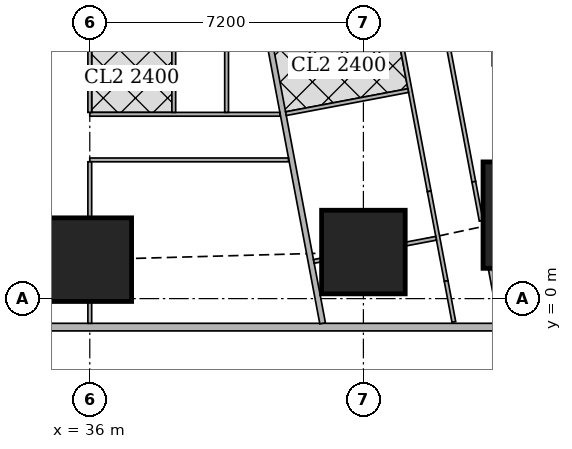
"""IFC4 building model, lengths in metres.
Left out: names, types, materials, properties, quantities, classifications, styles, units other than length and angle.
Written with IfcOpenShell. Run it as: python <this file> out.ifc"""

import sys

from ifc_helpers import new_model, si_unit, direction, frame, frame_2d, origin, origin_2d, place, context, subcontext, project, spatial, rectangle, extrude, element, fill, save


model = new_model("IFC4")
c1 = context("Model", 3, precision=1e-05, world=origin(), true_north=direction((0.0, 1.0)))
c2 = subcontext(c1, "Body", "Model", "MODEL_VIEW")
j1 = project(units=[si_unit("LENGTHUNIT", "METRE"), si_unit("PLANEANGLEUNIT", "RADIAN")], contexts=[c1])
p1 = place(None, origin())
s1 = spatial("IfcSite", under=j1, at=p1, CompositionType="ELEMENT")
p2 = place(p1, origin())
s2 = spatial("IfcBuilding", under=s1, at=p2, CompositionType="ELEMENT")
p3 = place(p2, frame((0.0, 0.0, 100.4)))
s3 = spatial("IfcBuildingStorey", under=s2, at=p3, CompositionType="ELEMENT", Elevation=100.4)
for number, where, z_axis, x_axis in (
    (1, (36.0, 1.025, 0.0), (0.0, 0.0, 1.0), (1.0, 0.0, 0.0)),
    (2, (43.2, 1.225, 0.0), (0.0, 0.0, 1.0), (1.0, 0.0, 0.0)),
):
    element("IfcColumn", number, at=place(p3, frame(where, z_axis=z_axis, x_axis=x_axis)), inside=s3, PredefinedType="COLUMN", context=c2, shape_type="SweptSolid", body=[
        extrude(rectangle(XDim=2.2, YDim=2.2, at=origin_2d()), origin(), (0.0, 0.0, 1.0), 3.75),
    ])
p4 = place(p3, frame((47.748, 2.197, 0.0), z_axis=(0.0, 0.0, 1.0), x_axis=(1.0, 0.0, 0.0)))
e3 = element("IfcColumn", 3, at=p4, inside=s3, PredefinedType="COLUMN", context=c2, shape_type="SweptSolid", body=[
    extrude(rectangle(XDim=2.8, YDim=2.8, at=origin_2d()), origin(), (0.0, 0.0, 1.0), 3.75),
])
p5 = place(p3, frame((2.163, -0.75, 0.0), z_axis=(0.0, 0.0, 1.0), x_axis=(1.0, 0.0, 0.0)))
e4 = element("IfcWall", 4, at=p5, inside=s3, PredefinedType="SOLIDWALL", context=c2, shape_type="SweptSolid", body=[
    extrude(rectangle(XDim=45.628, YDim=0.2, at=frame_2d((22.814, 0.0))), origin(), (0.0, 0.0, 1.0), 3.5),
])
p6 = place(p5, frame((9.537, 0.0, 0.9)))
e5 = element("IfcOpeningElement", 5, at=p6, cuts=e4, PredefinedType="OPENING", context=c2, shape_type="SweptSolid", body=[
    extrude(rectangle(XDim=1.8, YDim=1.5, at=frame_2d((0.9, 0.75))), frame((0.0, 0.11, 0.0), z_axis=(0.0, -1.0, 0.0), x_axis=(1.0, 0.0, 0.0)), (0.0, 0.0, 1.0), 0.22),
])
p7 = place(p5, frame((13.137, 0.0, 0.9)))
e6 = element("IfcOpeningElement", 6, at=p7, cuts=e4, PredefinedType="OPENING", context=c2, shape_type="SweptSolid", body=[
    extrude(rectangle(XDim=1.8, YDim=1.5, at=frame_2d((0.9, 0.75))), frame((0.0, 0.11, 0.0), z_axis=(0.0, -1.0, 0.0), x_axis=(1.0, 0.0, 0.0)), (0.0, 0.0, 1.0), 0.22),
])
p8 = place(p5, frame((16.737, 0.0, 0.9)))
e7 = element("IfcOpeningElement", 7, at=p8, cuts=e4, PredefinedType="OPENING", context=c2, shape_type="SweptSolid", body=[
    extrude(rectangle(XDim=1.8, YDim=1.5, at=frame_2d((0.9, 0.75))), frame((0.0, 0.11, 0.0), z_axis=(0.0, -1.0, 0.0), x_axis=(1.0, 0.0, 0.0)), (0.0, 0.0, 1.0), 0.22),
])
p9 = place(p5, frame((20.337, 0.0, 0.9)))
e8 = element("IfcOpeningElement", 8, at=p9, cuts=e4, PredefinedType="OPENING", context=c2, shape_type="SweptSolid", body=[
    extrude(rectangle(XDim=1.8, YDim=1.5, at=frame_2d((0.9, 0.75))), frame((0.0, 0.11, 0.0), z_axis=(0.0, -1.0, 0.0), x_axis=(1.0, 0.0, 0.0)), (0.0, 0.0, 1.0), 0.22),
])
p10 = place(p5, frame((23.937, 0.0, 0.9)))
e9 = element("IfcOpeningElement", 9, at=p10, cuts=e4, PredefinedType="OPENING", context=c2, shape_type="SweptSolid", body=[
    extrude(rectangle(XDim=1.8, YDim=1.5, at=frame_2d((0.9, 0.75))), frame((0.0, 0.11, 0.0), z_axis=(0.0, -1.0, 0.0), x_axis=(1.0, 0.0, 0.0)), (0.0, 0.0, 1.0), 0.22),
])
p11 = place(p5, frame((27.537, 0.0, 0.9)))
e10 = element("IfcOpeningElement", 10, at=p11, cuts=e4, PredefinedType="OPENING", context=c2, shape_type="SweptSolid", body=[
    extrude(rectangle(XDim=1.8, YDim=1.5, at=frame_2d((0.9, 0.75))), frame((0.0, 0.11, 0.0), z_axis=(0.0, -1.0, 0.0), x_axis=(1.0, 0.0, 0.0)), (0.0, 0.0, 1.0), 0.22),
])
p12 = place(p5, frame((31.137, 0.0, 0.9)))
e11 = element("IfcOpeningElement", 11, at=p12, cuts=e4, PredefinedType="OPENING", context=c2, shape_type="SweptSolid", body=[
    extrude(rectangle(XDim=1.8, YDim=1.5, at=frame_2d((0.9, 0.75))), frame((0.0, 0.11, 0.0), z_axis=(0.0, -1.0, 0.0), x_axis=(1.0, 0.0, 0.0)), (0.0, 0.0, 1.0), 0.22),
])
p13 = place(p5, frame((34.737, 0.0, 0.9)))
e12 = element("IfcOpeningElement", 12, at=p13, cuts=e4, PredefinedType="OPENING", context=c2, shape_type="SweptSolid", body=[
    extrude(rectangle(XDim=1.8, YDim=1.5, at=frame_2d((0.9, 0.75))), frame((0.0, 0.11, 0.0), z_axis=(0.0, -1.0, 0.0), x_axis=(1.0, 0.0, 0.0)), (0.0, 0.0, 1.0), 0.22),
])
p14 = place(p3, frame((50.653, 2.703, 0.0), z_axis=(0.0, 0.0, 1.0), x_axis=(-0.185612026696, 0.982623109613, 0.0)))
e13 = element("IfcWall", 13, at=p14, inside=s3, PredefinedType="SOLIDWALL", context=c2, shape_type="SweptSolid", body=[
    extrude(rectangle(XDim=41.393, YDim=0.2, at=frame_2d((20.697, 0.0))), origin(), (0.0, 0.0, 1.0), 3.5),
])
p15 = place(p14, frame((1.633, 0.0, 0.9)))
e14 = element("IfcOpeningElement", 14, at=p15, cuts=e13, PredefinedType="OPENING", context=c2, shape_type="SweptSolid", body=[
    extrude(rectangle(XDim=1.8, YDim=1.5, at=frame_2d((0.9, 0.75))), frame((0.0, 0.11, 0.0), z_axis=(0.0, -1.0, 0.0), x_axis=(1.0, 0.0, 0.0)), (0.0, 0.0, 1.0), 0.22),
])
p16 = place(p14, frame((6.032, 0.0, 0.9)))
e15 = element("IfcOpeningElement", 15, at=p16, cuts=e13, PredefinedType="OPENING", context=c2, shape_type="SweptSolid", body=[
    extrude(rectangle(XDim=1.8, YDim=1.5, at=frame_2d((0.9, 0.75))), frame((0.0, 0.11, 0.0), z_axis=(0.0, -1.0, 0.0), x_axis=(1.0, 0.0, 0.0)), (0.0, 0.0, 1.0), 0.22),
])
p17 = place(p14, frame((9.848, 0.0, 0.9)))
e16 = element("IfcOpeningElement", 16, at=p17, cuts=e13, PredefinedType="OPENING", context=c2, shape_type="SweptSolid", body=[
    extrude(rectangle(XDim=1.8, YDim=1.5, at=frame_2d((0.9, 0.75))), frame((0.0, 0.11, 0.0), z_axis=(0.0, -1.0, 0.0), x_axis=(1.0, 0.0, 0.0)), (0.0, 0.0, 1.0), 0.22),
])
p18 = place(p14, frame((13.664, 0.0, 0.9)))
e17 = element("IfcOpeningElement", 17, at=p18, cuts=e13, PredefinedType="OPENING", context=c2, shape_type="SweptSolid", body=[
    extrude(rectangle(XDim=1.8, YDim=1.5, at=frame_2d((0.9, 0.75))), frame((0.0, 0.11, 0.0), z_axis=(0.0, -1.0, 0.0), x_axis=(1.0, 0.0, 0.0)), (0.0, 0.0, 1.0), 0.22),
])
p19 = place(p14, frame((17.481, 0.0, 0.9)))
e18 = element("IfcOpeningElement", 18, at=p19, cuts=e13, PredefinedType="OPENING", context=c2, shape_type="SweptSolid", body=[
    extrude(rectangle(XDim=1.8, YDim=1.5, at=frame_2d((0.9, 0.75))), frame((0.0, 0.11, 0.0), z_axis=(0.0, -1.0, 0.0), x_axis=(1.0, 0.0, 0.0)), (0.0, 0.0, 1.0), 0.22),
])
p20 = place(p14, frame((21.297, 0.0, 0.9)))
e19 = element("IfcOpeningElement", 19, at=p20, cuts=e13, PredefinedType="OPENING", context=c2, shape_type="SweptSolid", body=[
    extrude(rectangle(XDim=1.8, YDim=1.5, at=frame_2d((0.9, 0.75))), frame((0.0, 0.11, 0.0), z_axis=(0.0, -1.0, 0.0), x_axis=(1.0, 0.0, 0.0)), (0.0, 0.0, 1.0), 0.22),
])
p21 = place(p14, frame((25.113, 0.0, 0.9)))
e20 = element("IfcOpeningElement", 20, at=p21, cuts=e13, PredefinedType="OPENING", context=c2, shape_type="SweptSolid", body=[
    extrude(rectangle(XDim=1.8, YDim=1.5, at=frame_2d((0.9, 0.75))), frame((0.0, 0.11, 0.0), z_axis=(0.0, -1.0, 0.0), x_axis=(1.0, 0.0, 0.0)), (0.0, 0.0, 1.0), 0.22),
])
p22 = place(p14, frame((28.93, 0.0, 0.9)))
e21 = element("IfcOpeningElement", 21, at=p22, cuts=e13, PredefinedType="OPENING", context=c2, shape_type="SweptSolid", body=[
    extrude(rectangle(XDim=1.8, YDim=1.5, at=frame_2d((0.9, 0.75))), frame((0.0, 0.11, 0.0), z_axis=(0.0, -1.0, 0.0), x_axis=(1.0, 0.0, 0.0)), (0.0, 0.0, 1.0), 0.22),
])
p23 = place(p14, frame((32.746, 0.0, 0.9)))
e22 = element("IfcOpeningElement", 22, at=p23, cuts=e13, PredefinedType="OPENING", context=c2, shape_type="SweptSolid", body=[
    extrude(rectangle(XDim=1.8, YDim=1.5, at=frame_2d((0.9, 0.75))), frame((0.0, 0.11, 0.0), z_axis=(0.0, -1.0, 0.0), x_axis=(1.0, 0.0, 0.0)), (0.0, 0.0, 1.0), 0.22),
])
p24 = place(p14, frame((36.481, 0.0, 0.9)))
e23 = element("IfcOpeningElement", 23, at=p24, cuts=e13, PredefinedType="OPENING", context=c2, shape_type="SweptSolid", body=[
    extrude(rectangle(XDim=1.8, YDim=1.5, at=frame_2d((0.9, 0.75))), frame((0.0, 0.11, 0.0), z_axis=(0.0, -1.0, 0.0), x_axis=(1.0, 0.0, 0.0)), (0.0, 0.0, 1.0), 0.22),
])
p25 = place(p3, frame((33.382, 45.65, 0.0), z_axis=(0.0, 0.0, 1.0), x_axis=(0.185593544777, -0.982626600565, 0.0)))
e24 = element("IfcWall", 24, at=p25, inside=s3, PredefinedType="SOLIDWALL", context=c2, shape_type="SweptSolid", body=[
    extrude(rectangle(XDim=47.118, YDim=0.15, at=frame_2d((23.559, 0.0))), origin(), (0.0, 0.0, 1.0), 2.2),
])
p26 = place(p25, frame((10.662, 0.0, 0.0)))
e25 = element("IfcOpeningElement", 25, at=p26, cuts=e24, PredefinedType="OPENING", context=c2, shape_type="SweptSolid", body=[
    extrude(rectangle(XDim=1.0, YDim=2.1, at=frame_2d((0.5, 1.05))), frame((0.0, 0.085, 0.0), z_axis=(0.0, -1.0, 0.0), x_axis=(1.0, 0.0, 0.0)), (0.0, 0.0, 1.0), 0.17),
])
p27 = place(p25, frame((15.237, 0.0, 0.0)))
e26 = element("IfcOpeningElement", 26, at=p27, cuts=e24, PredefinedType="OPENING", context=c2, shape_type="SweptSolid", body=[
    extrude(rectangle(XDim=1.0, YDim=2.1, at=frame_2d((0.5, 1.05))), frame((0.0, 0.085, 0.0), z_axis=(0.0, -1.0, 0.0), x_axis=(1.0, 0.0, 0.0)), (0.0, 0.0, 1.0), 0.17),
])
p28 = place(p25, frame((27.341, 0.0, 0.0)))
e27 = element("IfcOpeningElement", 27, at=p28, cuts=e24, PredefinedType="OPENING", context=c2, shape_type="SweptSolid", body=[
    extrude(rectangle(XDim=1.0, YDim=2.1, at=frame_2d((0.5, 1.05))), frame((0.0, 0.085, 0.0), z_axis=(0.0, -1.0, 0.0), x_axis=(1.0, 0.0, 0.0)), (0.0, 0.0, 1.0), 0.17),
])
p29 = place(p25, frame((33.833, 0.0, 0.0)))
e28 = element("IfcOpeningElement", 28, at=p29, cuts=e24, PredefinedType="OPENING", context=c2, shape_type="SweptSolid", body=[
    extrude(rectangle(XDim=1.0, YDim=2.1, at=frame_2d((0.5, 1.05))), frame((0.0, 0.085, 0.0), z_axis=(0.0, -1.0, 0.0), x_axis=(1.0, 0.0, 0.0)), (0.0, 0.0, 1.0), 0.17),
])
p30 = place(p3, frame((41.229, 3.65, 0.0), z_axis=(0.0, 0.0, 1.0), x_axis=(-1.0, 0.0, 0.0)))
e29 = element("IfcWall", 29, at=p30, inside=s3, PredefinedType="PARTITIONING", context=c2, shape_type="SweptSolid", body=[
    extrude(rectangle(XDim=5.229, YDim=0.1, at=frame_2d((2.615, 0.0))), origin(), (0.0, 0.0, 1.0), 3.5),
])
p31 = place(p30, frame((4.129, 0.0, 0.0)))
e30 = element("IfcOpeningElement", 30, at=p31, cuts=e29, PredefinedType="OPENING", context=c2, shape_type="SweptSolid", body=[
    extrude(rectangle(XDim=0.9, YDim=2.1, at=frame_2d((0.45, 1.05))), frame((0.0, 0.06, 0.0), z_axis=(0.0, -1.0, 0.0), x_axis=(1.0, 0.0, 0.0)), (0.0, 0.0, 1.0), 0.12),
])
p32 = place(p3, frame((41.002, 4.85, 0.0), z_axis=(0.0, 0.0, 1.0), x_axis=(-1.0, 0.0, 0.0)))
e31 = element("IfcWall", 31, at=p32, inside=s3, PredefinedType="PARTITIONING", context=c2, shape_type="SweptSolid", body=[
    extrude(rectangle(XDim=5.002, YDim=0.1, at=frame_2d((2.501, 0.0))), origin(), (0.0, 0.0, 1.0), 3.5),
])
p33 = place(p32, frame((3.447, 0.0, 0.0)))
e32 = element("IfcOpeningElement", 32, at=p33, cuts=e31, PredefinedType="OPENING", context=c2, shape_type="SweptSolid", body=[
    extrude(rectangle(XDim=0.9, YDim=2.1, at=frame_2d((0.45, 1.05))), frame((0.0, 0.06, 0.0), z_axis=(0.0, -1.0, 0.0), x_axis=(1.0, 0.0, 0.0)), (0.0, 0.0, 1.0), 0.12),
])
p34 = place(p32, frame((0.15, 0.0, 0.0)))
e33 = element("IfcOpeningElement", 33, at=p34, cuts=e31, PredefinedType="OPENING", context=c2, shape_type="SweptSolid", body=[
    extrude(rectangle(XDim=0.9, YDim=2.1, at=frame_2d((0.45, 1.05))), frame((0.0, 0.06, 0.0), z_axis=(0.0, -1.0, 0.0), x_axis=(1.0, 0.0, 0.0)), (0.0, 0.0, 1.0), 0.12),
])
p35 = place(p32, frame((1.647, 0.0, 0.0)))
e34 = element("IfcOpeningElement", 34, at=p35, cuts=e31, PredefinedType="OPENING", context=c2, shape_type="SweptSolid", body=[
    extrude(rectangle(XDim=0.9, YDim=2.1, at=frame_2d((0.45, 1.05))), frame((0.0, 0.06, 0.0), z_axis=(0.0, -1.0, 0.0), x_axis=(1.0, 0.0, 0.0)), (0.0, 0.0, 1.0), 0.12),
])
p36 = place(p3, frame((36.0, -0.65, 0.0), z_axis=(0.0, 0.0, 1.0), x_axis=(0.0, 1.0, 0.0)))
e35 = element("IfcWall", 35, at=p36, inside=s3, PredefinedType="PARTITIONING", context=c2, shape_type="SweptSolid", body=[
    extrude(rectangle(XDim=0.574, YDim=0.1, at=frame_2d((0.287, 0.0))), origin(), (0.0, 0.0, 1.0), 3.5),
])
p37 = place(p3, frame((36.0, 2.126, 0.0), z_axis=(0.0, 0.0, 1.0), x_axis=(0.0, 1.0, 0.0)))
e36 = element("IfcWall", 36, at=p37, inside=s3, PredefinedType="PARTITIONING", context=c2, shape_type="SweptSolid", body=[
    extrude(rectangle(XDim=1.474, YDim=0.1, at=frame_2d((0.737, 0.0))), origin(), (0.0, 0.0, 1.0), 3.5),
])
p38 = place(p3, frame((36.0, 4.9, 0.0), z_axis=(0.0, 0.0, 1.0), x_axis=(0.0, 1.0, 0.0)))
e37 = element("IfcWall", 37, at=p38, inside=s3, PredefinedType="PARTITIONING", context=c2, shape_type="SweptSolid", body=[
    extrude(rectangle(XDim=1.799, YDim=0.1, at=frame_2d((0.899, 0.0))), origin(), (0.0, 0.0, 1.0), 3.5),
])
for number, where, z_axis, x_axis in (
    (38, (39.6, 4.9, 0.0), (0.0, 0.0, 1.0), (0.0, 1.0, 0.0)),
    (39, (38.21, 4.9, 0.0), (0.0, 0.0, 1.0), (0.0, 1.0, 0.0)),
):
    element("IfcWall", number, at=place(p3, frame(where, z_axis=z_axis, x_axis=x_axis)), inside=s3, PredefinedType="PARTITIONING", context=c2, shape_type="SweptSolid", body=[
        extrude(rectangle(XDim=3.275, YDim=0.1, at=frame_2d((1.638, 0.0))), origin(), (0.0, 0.0, 1.0), 3.5),
    ])
p39 = place(p3, frame((44.727, 10.366, 0.0), z_axis=(0.0, 0.0, 1.0), x_axis=(0.185678775129, -0.982610498858, 0.0)))
e40 = element("IfcWall", 40, at=p39, inside=s3, PredefinedType="PARTITIONING", context=c2, shape_type="SweptSolid", body=[
    extrude(rectangle(XDim=7.421, YDim=0.1, at=frame_2d((3.71, 0.0))), origin(), (0.0, 0.0, 1.0), 3.5),
])
p40 = place(p39, frame((0.151, 0.0, 0.0)))
e41 = element("IfcOpeningElement", 41, at=p40, cuts=e40, PredefinedType="OPENING", context=c2, shape_type="SweptSolid", body=[
    extrude(rectangle(XDim=0.9, YDim=2.1, at=frame_2d((0.45, 1.05))), frame((0.0, 0.06, 0.0), z_axis=(0.0, -1.0, 0.0), x_axis=(1.0, 0.0, 0.0)), (0.0, 0.0, 1.0), 0.12),
])
p41 = place(p39, frame((4.55, 0.0, 0.0)))
e42 = element("IfcOpeningElement", 42, at=p41, cuts=e40, PredefinedType="OPENING", context=c2, shape_type="SweptSolid", body=[
    extrude(rectangle(XDim=0.9, YDim=2.1, at=frame_2d((0.45, 1.05))), frame((0.0, 0.06, 0.0), z_axis=(0.0, -1.0, 0.0), x_axis=(1.0, 0.0, 0.0)), (0.0, 0.0, 1.0), 0.12),
])
p42 = place(p3, frame((46.105, 3.074, 0.0), z_axis=(0.0, 0.0, 1.0), x_axis=(0.185897769544, -0.982569091351, 0.0)))
e43 = element("IfcWall", 43, at=p42, inside=s3, PredefinedType="PARTITIONING", context=c2, shape_type="SweptSolid", body=[
    extrude(rectangle(XDim=1.044, YDim=0.1, at=frame_2d((0.522, 0.0))), origin(), (0.0, 0.0, 1.0), 2.05),
])
p43 = place(p3, frame((46.537, 0.787, 0.0), z_axis=(0.0, 0.0, 1.0), x_axis=(0.185348284603, -0.982672892368, 0.0)))
e44 = element("IfcWall", 44, at=p43, inside=s3, PredefinedType="PARTITIONING", context=c2, shape_type="SweptSolid", body=[
    extrude(rectangle(XDim=1.419, YDim=0.1, at=frame_2d((0.709, 0.0))), origin(), (0.0, 0.0, 1.0), 2.05),
])
p44 = place(p3, frame((44.049, 7.49, 0.0), z_axis=(0.0, 0.0, 1.0), x_axis=(0.185666332607, -0.982612849975, 0.0)))
e45 = element("IfcWall", 45, at=p44, inside=s3, PredefinedType="PARTITIONING", context=c2, shape_type="SweptSolid", body=[
    extrude(rectangle(XDim=4.75, YDim=0.1, at=frame_2d((2.375, 0.0))), origin(), (0.0, 0.0, 1.0), 3.5),
])
p45 = place(p44, frame((0.8, 0.0, 0.0)))
e46 = element("IfcOpeningElement", 46, at=p45, cuts=e45, PredefinedType="OPENING", context=c2, shape_type="SweptSolid", body=[
    extrude(rectangle(XDim=0.9, YDim=2.1, at=frame_2d((0.45, 1.05))), frame((0.0, 0.06, 0.0), z_axis=(0.0, -1.0, 0.0), x_axis=(1.0, 0.0, 0.0)), (0.0, 0.0, 1.0), 0.12),
])
p46 = place(p44, frame((2.396, 0.0, 0.0)))
e47 = element("IfcOpeningElement", 47, at=p46, cuts=e45, PredefinedType="OPENING", context=c2, shape_type="SweptSolid", body=[
    extrude(rectangle(XDim=0.9, YDim=2.1, at=frame_2d((0.45, 1.05))), frame((0.0, 0.06, 0.0), z_axis=(0.0, -1.0, 0.0), x_axis=(1.0, 0.0, 0.0)), (0.0, 0.0, 1.0), 0.12),
])
p47 = place(p3, frame((44.931, 2.823, 0.0), z_axis=(0.0, 0.0, 1.0), x_axis=(0.185631845838, -0.982619365681, 0.0)))
e48 = element("IfcWall", 48, at=p47, inside=s3, PredefinedType="PARTITIONING", context=c2, shape_type="SweptSolid", body=[
    extrude(rectangle(XDim=2.403, YDim=0.1, at=frame_2d((1.201, 0.0))), origin(), (0.0, 0.0, 1.0), 2.05),
])
p48 = place(p3, frame((45.377, 0.462, 0.0), z_axis=(0.0, 0.0, 1.0), x_axis=(0.185513480919, -0.982641719243, 0.0)))
e49 = element("IfcWall", 49, at=p48, inside=s3, PredefinedType="PARTITIONING", context=c2, shape_type="SweptSolid", body=[
    extrude(rectangle(XDim=1.095, YDim=0.1, at=frame_2d((0.547, 0.0))), origin(), (0.0, 0.0, 1.0), 3.5),
])
p49 = place(p3, frame((45.114, 1.587, 0.0), z_axis=(0.0, 0.0, 1.0), x_axis=(-0.982624706348, -0.185603573443, 0.0)))
e50 = element("IfcWall", 50, at=p49, inside=s3, PredefinedType="PARTITIONING", context=c2, shape_type="SweptSolid", body=[
    extrude(rectangle(XDim=0.818, YDim=0.1, at=frame_2d((0.409, 0.0))), origin(), (0.0, 0.0, 1.0), 2.05),
])
p50 = place(p3, frame((42.09, 1.016, 0.0), z_axis=(0.0, 0.0, 1.0), x_axis=(-0.982208563973, -0.187793335502, 0.0)))
e51 = element("IfcWall", 51, at=p50, inside=s3, PredefinedType="PARTITIONING", context=c2, shape_type="SweptSolid", body=[
    extrude(rectangle(XDim=0.198, YDim=0.1, at=frame_2d((0.099, 0.0))), origin(), (0.0, 0.0, 1.0), 2.05),
])
p51 = place(p3, frame((44.379, 5.474, 0.0), z_axis=(0.0, 0.0, 1.0), x_axis=(-0.982607026909, -0.185697147715, 0.0)))
e52 = element("IfcWall", 52, at=p51, inside=s3, PredefinedType="PARTITIONING", context=c2, shape_type="SweptSolid", body=[
    extrude(rectangle(XDim=3.275, YDim=0.1, at=frame_2d((1.637, 0.0))), origin(), (0.0, 0.0, 1.0), 3.5),
])
p52 = place(p12, origin())
e53 = element("IfcWindow", 53, at=p52, inside=s3, PartitioningType="SINGLE_PANEL", PredefinedType="WINDOW", context=c2, shape_type="SweptSolid", body=[
    extrude(rectangle(XDim=1.8, YDim=1.5, at=frame_2d((0.9, 0.75))), frame((0.0, 0.03, 0.0), z_axis=(0.0, -1.0, 0.0), x_axis=(1.0, 0.0, 0.0)), (0.0, 0.0, 1.0), 0.06),
])
fill(e11, e53)
p53 = place(p13, origin())
e54 = element("IfcWindow", 54, at=p53, inside=s3, PartitioningType="SINGLE_PANEL", PredefinedType="WINDOW", context=c2, shape_type="SweptSolid", body=[
    extrude(rectangle(XDim=1.8, YDim=1.5, at=frame_2d((0.9, 0.75))), frame((0.0, 0.03, 0.0), z_axis=(0.0, -1.0, 0.0), x_axis=(1.0, 0.0, 0.0)), (0.0, 0.0, 1.0), 0.06),
])
fill(e12, e54)
p54 = place(p31, origin())
e55 = element("IfcDoor", 55, at=p54, inside=s3, OperationType="SINGLE_SWING_LEFT", PredefinedType="DOOR", context=c2, shape_type="SweptSolid", body=[
    extrude(rectangle(XDim=0.9, YDim=2.1, at=frame_2d((0.45, 1.05))), frame((0.0, 0.025, 0.0), z_axis=(0.0, -1.0, 0.0), x_axis=(1.0, 0.0, 0.0)), (0.0, 0.0, 1.0), 0.05),
])
fill(e30, e55)
p55 = place(p33, origin())
e56 = element("IfcDoor", 56, at=p55, inside=s3, OperationType="SINGLE_SWING_LEFT", PredefinedType="DOOR", context=c2, shape_type="SweptSolid", body=[
    extrude(rectangle(XDim=0.9, YDim=2.1, at=frame_2d((0.45, 1.05))), frame((0.0, 0.025, 0.0), z_axis=(0.0, -1.0, 0.0), x_axis=(1.0, 0.0, 0.0)), (0.0, 0.0, 1.0), 0.05),
])
fill(e32, e56)
p56 = place(p34, origin())
e57 = element("IfcDoor", 57, at=p56, inside=s3, OperationType="SINGLE_SWING_RIGHT", PredefinedType="DOOR", context=c2, shape_type="SweptSolid", body=[
    extrude(rectangle(XDim=0.9, YDim=2.1, at=frame_2d((0.45, 1.05))), frame((0.0, 0.025, 0.0), z_axis=(0.0, -1.0, 0.0), x_axis=(1.0, 0.0, 0.0)), (0.0, 0.0, 1.0), 0.05),
])
fill(e33, e57)
p57 = place(p35, origin())
e58 = element("IfcDoor", 58, at=p57, inside=s3, OperationType="SINGLE_SWING_LEFT", PredefinedType="DOOR", context=c2, shape_type="SweptSolid", body=[
    extrude(rectangle(XDim=0.9, YDim=2.1, at=frame_2d((0.45, 1.05))), frame((0.0, 0.025, 0.0), z_axis=(0.0, -1.0, 0.0), x_axis=(1.0, 0.0, 0.0)), (0.0, 0.0, 1.0), 0.05),
])
fill(e34, e58)
p58 = place(p41, origin())
e59 = element("IfcDoor", 59, at=p58, inside=s3, OperationType="SINGLE_SWING_LEFT", PredefinedType="DOOR", context=c2, shape_type="SweptSolid", body=[
    extrude(rectangle(XDim=0.9, YDim=2.1, at=frame_2d((0.45, 1.05))), frame((0.0, 0.025, 0.0), z_axis=(0.0, -1.0, 0.0), x_axis=(1.0, 0.0, 0.0)), (0.0, 0.0, 1.0), 0.05),
])
fill(e42, e59)
p59 = place(p45, origin())
e60 = element("IfcDoor", 60, at=p59, inside=s3, OperationType="SINGLE_SWING_LEFT", PredefinedType="DOOR", context=c2, shape_type="SweptSolid", body=[
    extrude(rectangle(XDim=0.9, YDim=2.1, at=frame_2d((0.45, 1.05))), frame((0.0, 0.025, 0.0), z_axis=(0.0, -1.0, 0.0), x_axis=(1.0, 0.0, 0.0)), (0.0, 0.0, 1.0), 0.05),
])
fill(e46, e60)
p60 = place(p46, origin())
e61 = element("IfcDoor", 61, at=p60, inside=s3, OperationType="SINGLE_SWING_RIGHT", PredefinedType="DOOR", context=c2, shape_type="SweptSolid", body=[
    extrude(rectangle(XDim=0.9, YDim=2.1, at=frame_2d((0.45, 1.05))), frame((0.0, 0.025, 0.0), z_axis=(0.0, -1.0, 0.0), x_axis=(1.0, 0.0, 0.0)), (0.0, 0.0, 1.0), 0.05),
])
fill(e47, e61)
save(model, sys.argv[1])
